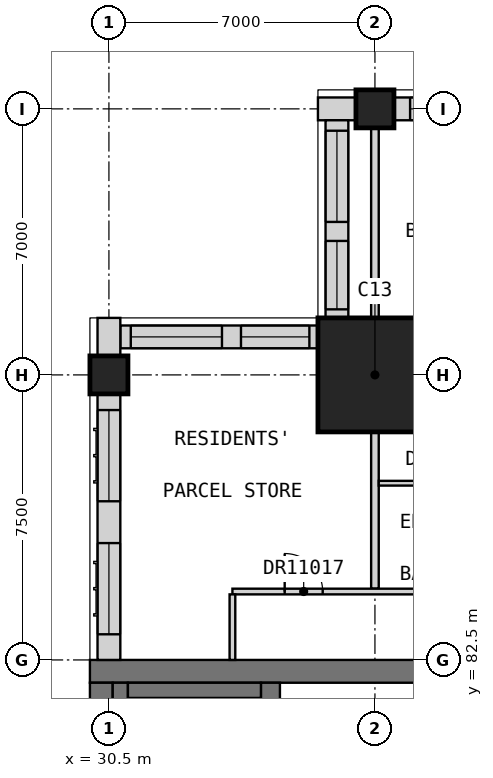
"""IFC4 building model, lengths in metres.
Left out: names, types, materials, properties, quantities, classifications, styles, units other than length and angle.
Written with IfcOpenShell. Run it as: python <this file> out.ifc"""

import sys

from ifc_helpers import new_model, si_unit, direction, frame, frame_2d, origin, origin_2d, place, context, subcontext, project, spatial, rectangle, extrude, element, fill, save


model = new_model("IFC4")
c1 = context("Model", 3, precision=1e-05, world=origin(), true_north=direction((0.0, 1.0)))
c2 = subcontext(c1, "Body", "Model", "MODEL_VIEW")
j1 = project(units=[si_unit("LENGTHUNIT", "METRE"), si_unit("PLANEANGLEUNIT", "RADIAN")], contexts=[c1])
p1 = place(None, origin())
s1 = spatial("IfcSite", under=j1, at=p1, CompositionType="ELEMENT")
p2 = place(p1, origin())
s2 = spatial("IfcBuilding", under=s1, at=p2, CompositionType="ELEMENT")
p3 = place(p2, frame((0.0, 0.0, 276.7)))
s3 = spatial("IfcBuildingStorey", under=s2, at=p3, CompositionType="ELEMENT", Elevation=276.7)
for number, where, z_axis, x_axis in (
    (1, (30.5, 90.0, 0.0), (0.0, 0.0, 1.0), (1.0, 0.0, 0.0)),
    (2, (37.5, 97.0, 0.0), (0.0, 0.0, 1.0), (1.0, 0.0, 0.0)),
):
    element("IfcColumn", number, at=place(p3, frame(where, z_axis=z_axis, x_axis=x_axis)), inside=s3, PredefinedType="COLUMN", context=c2, shape_type="SweptSolid", body=[
        extrude(rectangle(XDim=1.0, YDim=1.0, at=origin_2d()), origin(), (0.0, 0.0, 1.0), 3.5),
    ])
p4 = place(p3, frame((37.5, 90.0, 0.0), z_axis=(0.0, 0.0, 1.0), x_axis=(1.0, 0.0, 0.0)))
e3 = element("IfcColumn", 3, at=p4, inside=s3, PredefinedType="COLUMN", context=c2, shape_type="SweptSolid", body=[
    extrude(rectangle(XDim=3.0, YDim=3.0, at=origin_2d()), origin(), (0.0, 0.0, 1.0), 3.5),
])
p5 = place(p3, frame((30.0, 82.2, 0.0), z_axis=(0.0, 0.0, 1.0), x_axis=(1.0, 0.0, 0.0)))
e4 = element("IfcWall", 4, at=p5, inside=s3, PredefinedType="SHEAR", context=c2, shape_type="SweptSolid", body=[
    extrude(rectangle(XDim=30.0, YDim=0.6, at=frame_2d((15.0, 0.0))), origin(), (0.0, 0.0, 1.0), 3.5),
])
p6 = place(p3, frame((30.3, 60.6, 0.0), z_axis=(0.0, 0.0, 1.0), x_axis=(0.0, 1.0, 0.0)))
e5 = element("IfcWall", 5, at=p6, inside=s3, PredefinedType="SHEAR", context=c2, shape_type="SweptSolid", body=[
    extrude(rectangle(XDim=21.3, YDim=0.6, at=frame_2d((10.65, 0.0))), origin(), (0.0, 0.0, 1.0), 3.5),
])
p7 = place(p3, frame((34.75, 78.3, 0.0), z_axis=(0.0, 0.0, 1.0), x_axis=(0.0, 1.0, 0.0)))
e6 = element("IfcWall", 6, at=p7, inside=s3, PredefinedType="SHEAR", context=c2, shape_type="SweptSolid", body=[
    extrude(rectangle(XDim=3.6, YDim=0.5, at=frame_2d((1.8, 0.0))), origin(), (0.0, 0.0, 1.0), 3.5),
])
p8 = place(p3, frame((44.5, 97.0, 0.0), z_axis=(0.0, 0.0, 1.0), x_axis=(-1.0, 0.0, 0.0)))
e7 = element("IfcWall", 7, at=p8, inside=s3, PredefinedType="SOLIDWALL", context=c2, shape_type="SweptSolid", body=[
    extrude(rectangle(XDim=6.5, YDim=0.6, at=frame_2d((3.25, 0.0))), origin(), (0.0, 0.0, 1.0), 2.75),
])
p9 = place(p8, frame((3.675, 0.0, 0.8)))
e8 = element("IfcOpeningElement", 8, at=p9, cuts=e7, PredefinedType="OPENING", context=c2, shape_type="SweptSolid", body=[
    extrude(rectangle(XDim=2.4, YDim=1.8, at=frame_2d((1.2, 0.9))), frame((0.0, 0.31, 0.0), z_axis=(0.0, -1.0, 0.0), x_axis=(1.0, 0.0, 0.0)), (0.0, 0.0, 1.0), 0.62),
])
p10 = place(p8, frame((0.425, 0.0, 0.8)))
e9 = element("IfcOpeningElement", 9, at=p10, cuts=e7, PredefinedType="OPENING", context=c2, shape_type="SweptSolid", body=[
    extrude(rectangle(XDim=2.4, YDim=1.8, at=frame_2d((1.2, 0.9))), frame((0.0, 0.31, 0.0), z_axis=(0.0, -1.0, 0.0), x_axis=(1.0, 0.0, 0.0)), (0.0, 0.0, 1.0), 0.62),
])
p11 = place(p3, frame((37.0, 97.0, 0.0), z_axis=(0.0, 0.0, 1.0), x_axis=(-1.0, 0.0, 0.0)))
e10 = element("IfcWall", 10, at=p11, inside=s3, PredefinedType="SOLIDWALL", context=c2, shape_type="SweptSolid", body=[
    extrude(rectangle(XDim=1.0, YDim=0.6, at=frame_2d((0.5, 0.0))), origin(), (0.0, 0.0, 1.0), 3.25),
])
p12 = place(p3, frame((36.5, 96.7, 0.0), z_axis=(0.0, 0.0, 1.0), x_axis=(0.0, -1.0, 0.0)))
e11 = element("IfcWall", 11, at=p12, inside=s3, PredefinedType="SOLIDWALL", context=c2, shape_type="SweptSolid", body=[
    extrude(rectangle(XDim=5.2, YDim=0.6, at=frame_2d((2.6, 0.0))), origin(), (0.0, 0.0, 1.0), 3.25),
])
p13 = place(p12, frame((3.175, 0.0, 0.8)))
e12 = element("IfcOpeningElement", 12, at=p13, cuts=e11, PredefinedType="OPENING", context=c2, shape_type="SweptSolid", body=[
    extrude(rectangle(XDim=1.8, YDim=1.8, at=frame_2d((0.9, 0.9))), frame((0.0, 0.31, 0.0), z_axis=(0.0, -1.0, 0.0), x_axis=(1.0, 0.0, 0.0)), (0.0, 0.0, 1.0), 0.62),
])
p14 = place(p12, frame((0.275, 0.0, 0.8)))
e13 = element("IfcOpeningElement", 13, at=p14, cuts=e11, PredefinedType="OPENING", context=c2, shape_type="SweptSolid", body=[
    extrude(rectangle(XDim=2.4, YDim=1.8, at=frame_2d((1.2, 0.9))), frame((0.0, 0.31, 0.0), z_axis=(0.0, -1.0, 0.0), x_axis=(1.0, 0.0, 0.0)), (0.0, 0.0, 1.0), 0.62),
])
p15 = place(p3, frame((36.0, 91.0, 0.0), z_axis=(0.0, 0.0, 1.0), x_axis=(-1.0, 0.0, 0.0)))
e14 = element("IfcWall", 14, at=p15, inside=s3, PredefinedType="SOLIDWALL", context=c2, shape_type="SweptSolid", body=[
    extrude(rectangle(XDim=5.2, YDim=0.6, at=frame_2d((2.6, 0.0))), origin(), (0.0, 0.0, 1.0), 3.25),
])
p16 = place(p15, frame((2.525, 0.0, 0.8)))
e15 = element("IfcOpeningElement", 15, at=p16, cuts=e14, PredefinedType="OPENING", context=c2, shape_type="SweptSolid", body=[
    extrude(rectangle(XDim=2.4, YDim=1.8, at=frame_2d((1.2, 0.9))), frame((0.0, 0.31, 0.0), z_axis=(0.0, -1.0, 0.0), x_axis=(1.0, 0.0, 0.0)), (0.0, 0.0, 1.0), 0.62),
])
p17 = place(p15, frame((0.225, 0.0, 0.8)))
e16 = element("IfcOpeningElement", 16, at=p17, cuts=e14, PredefinedType="OPENING", context=c2, shape_type="SweptSolid", body=[
    extrude(rectangle(XDim=1.8, YDim=1.8, at=frame_2d((0.9, 0.9))), frame((0.0, 0.31, 0.0), z_axis=(0.0, -1.0, 0.0), x_axis=(1.0, 0.0, 0.0)), (0.0, 0.0, 1.0), 0.62),
])
p18 = place(p3, frame((30.5, 91.5, 0.0), z_axis=(0.0, 0.0, 1.0), x_axis=(0.0, -1.0, 0.0)))
e17 = element("IfcWall", 17, at=p18, inside=s3, PredefinedType="SOLIDWALL", context=c2, shape_type="SweptSolid", body=[
    extrude(rectangle(XDim=1.0, YDim=0.6, at=frame_2d((0.5, 0.0))), origin(), (0.0, 0.0, 1.0), 3.25),
])
p19 = place(p3, frame((30.5, 89.5, 0.0), z_axis=(0.0, 0.0, 1.0), x_axis=(0.0, -1.0, 0.0)))
e18 = element("IfcWall", 18, at=p19, inside=s3, PredefinedType="SOLIDWALL", context=c2, shape_type="SweptSolid", body=[
    extrude(rectangle(XDim=7.0, YDim=0.6, at=frame_2d((3.5, 0.0))), origin(), (0.0, 0.0, 1.0), 3.25),
])
p20 = place(p19, frame((3.925, 0.0, 0.8)))
e19 = element("IfcOpeningElement", 19, at=p20, cuts=e18, PredefinedType="OPENING", context=c2, shape_type="SweptSolid", body=[
    extrude(rectangle(XDim=2.4, YDim=1.8, at=frame_2d((1.2, 0.9))), frame((0.0, 0.31, 0.0), z_axis=(0.0, -1.0, 0.0), x_axis=(1.0, 0.0, 0.0)), (0.0, 0.0, 1.0), 0.62),
])
p21 = place(p19, frame((0.425, 0.0, 0.8)))
e20 = element("IfcOpeningElement", 20, at=p21, cuts=e18, PredefinedType="OPENING", context=c2, shape_type="SweptSolid", body=[
    extrude(rectangle(XDim=2.4, YDim=1.8, at=frame_2d((1.2, 0.9))), frame((0.0, 0.31, 0.0), z_axis=(0.0, -1.0, 0.0), x_axis=(1.0, 0.0, 0.0)), (0.0, 0.0, 1.0), 0.62),
])
p22 = place(p3, frame((30.8, 60.6, 0.0), z_axis=(0.0, 0.0, 1.0), x_axis=(0.0, 1.0, 0.0)))
e21 = element("IfcWall", 21, at=p22, inside=s3, PredefinedType="SOLIDWALL", context=c2, shape_type="SweptSolid", body=[
    extrude(rectangle(XDim=21.3, YDim=0.4, at=frame_2d((10.65, 0.0))), origin(), (0.0, 0.0, 1.0), 3.25),
])
p23 = place(p3, frame((31.0, 81.7, 0.0), z_axis=(0.0, 0.0, 1.0), x_axis=(1.0, 0.0, 0.0)))
e22 = element("IfcWall", 22, at=p23, inside=s3, PredefinedType="SOLIDWALL", context=c2, shape_type="SweptSolid", body=[
    extrude(rectangle(XDim=3.5, YDim=0.4, at=frame_2d((1.75, 0.0))), origin(), (0.0, 0.0, 1.0), 3.25),
])
p24 = place(p3, frame((37.5, 84.375, 0.0), z_axis=(0.0, 0.0, 1.0), x_axis=(0.0, 1.0, 0.0)))
e23 = element("IfcWall", 23, at=p24, inside=s3, PredefinedType="PARTITIONING", context=c2, shape_type="SweptSolid", body=[
    extrude(rectangle(XDim=13.125, YDim=0.2, at=frame_2d((6.562, 0.0))), origin(), (0.0, 0.0, 1.0), 2.75),
])
p25 = place(p3, frame((33.75, 84.3, 0.0), z_axis=(0.0, 0.0, 1.0), x_axis=(1.0, 0.0, 0.0)))
e24 = element("IfcWall", 24, at=p25, inside=s3, PredefinedType="PARTITIONING", context=c2, shape_type="SweptSolid", body=[
    extrude(rectangle(XDim=28.05, YDim=0.15, at=frame_2d((14.025, 0.0))), origin(), (0.0, 0.0, 1.0), 3.25),
])
p26 = place(p25, frame((1.375, 0.0, 0.0)))
e25 = element("IfcOpeningElement", 25, at=p26, cuts=e24, PredefinedType="OPENING", context=c2, shape_type="SweptSolid", body=[
    extrude(rectangle(XDim=1.0, YDim=2.1, at=frame_2d((0.5, 1.05))), frame((0.0, 0.085, 0.0), z_axis=(0.0, -1.0, 0.0), x_axis=(1.0, 0.0, 0.0)), (0.0, 0.0, 1.0), 0.17),
])
p27 = place(p25, frame((8.925, 0.0, 0.0)))
e26 = element("IfcOpeningElement", 26, at=p27, cuts=e24, PredefinedType="OPENING", context=c2, shape_type="SweptSolid", body=[
    extrude(rectangle(XDim=0.9, YDim=2.1, at=frame_2d((0.45, 1.05))), frame((0.0, 0.085, 0.0), z_axis=(0.0, -1.0, 0.0), x_axis=(1.0, 0.0, 0.0)), (0.0, 0.0, 1.0), 0.17),
])
p28 = place(p25, frame((20.175, 0.0, 0.0)))
e27 = element("IfcOpeningElement", 27, at=p28, cuts=e24, PredefinedType="OPENING", context=c2, shape_type="SweptSolid", body=[
    extrude(rectangle(XDim=0.9, YDim=2.1, at=frame_2d((0.45, 1.05))), frame((0.0, 0.085, 0.0), z_axis=(0.0, -1.0, 0.0), x_axis=(1.0, 0.0, 0.0)), (0.0, 0.0, 1.0), 0.17),
])
p29 = place(p25, frame((26.65, 0.0, 0.0)))
e28 = element("IfcOpeningElement", 28, at=p29, cuts=e24, PredefinedType="OPENING", context=c2, shape_type="SweptSolid", body=[
    extrude(rectangle(XDim=1.0, YDim=2.1, at=frame_2d((0.5, 1.05))), frame((0.0, 0.085, 0.0), z_axis=(0.0, -1.0, 0.0), x_axis=(1.0, 0.0, 0.0)), (0.0, 0.0, 1.0), 0.17),
])
p30 = place(p3, frame((33.75, 82.5, 0.0), z_axis=(0.0, 0.0, 1.0), x_axis=(0.0, 1.0, 0.0)))
e29 = element("IfcWall", 29, at=p30, inside=s3, PredefinedType="PARTITIONING", context=c2, shape_type="SweptSolid", body=[
    extrude(rectangle(XDim=1.725, YDim=0.15, at=frame_2d((0.863, 0.0))), origin(), (0.0, 0.0, 1.0), 3.25),
])
p31 = place(p3, frame((37.6, 90.0, 0.0), z_axis=(0.0, 0.0, 1.0), x_axis=(1.0, 0.0, 0.0)))
e30 = element("IfcWall", 30, at=p31, inside=s3, PredefinedType="PARTITIONING", context=c2, shape_type="SweptSolid", body=[
    extrude(rectangle(XDim=22.3, YDim=0.1, at=frame_2d((11.15, 0.0))), origin(), (0.0, 0.0, 1.0), 3.25),
])
p32 = place(p31, frame((1.475, 0.0, 0.0)))
e31 = element("IfcOpeningElement", 31, at=p32, cuts=e30, PredefinedType="OPENING", context=c2, shape_type="SweptSolid", body=[
    extrude(rectangle(XDim=0.9, YDim=2.1, at=frame_2d((0.45, 1.05))), frame((0.0, 0.06, 0.0), z_axis=(0.0, -1.0, 0.0), x_axis=(1.0, 0.0, 0.0)), (0.0, 0.0, 1.0), 0.12),
])
p33 = place(p31, frame((5.075, 0.0, 0.0)))
e32 = element("IfcOpeningElement", 32, at=p33, cuts=e30, PredefinedType="OPENING", context=c2, shape_type="SweptSolid", body=[
    extrude(rectangle(XDim=0.9, YDim=2.1, at=frame_2d((0.45, 1.05))), frame((0.0, 0.06, 0.0), z_axis=(0.0, -1.0, 0.0), x_axis=(1.0, 0.0, 0.0)), (0.0, 0.0, 1.0), 0.12),
])
p34 = place(p31, frame((12.575, 0.0, 0.0)))
e33 = element("IfcOpeningElement", 33, at=p34, cuts=e30, PredefinedType="OPENING", context=c2, shape_type="SweptSolid", body=[
    extrude(rectangle(XDim=0.9, YDim=2.1, at=frame_2d((0.45, 1.05))), frame((0.0, 0.06, 0.0), z_axis=(0.0, -1.0, 0.0), x_axis=(1.0, 0.0, 0.0)), (0.0, 0.0, 1.0), 0.12),
])
p35 = place(p31, frame((16.325, 0.0, 0.0)))
e34 = element("IfcOpeningElement", 34, at=p35, cuts=e30, PredefinedType="OPENING", context=c2, shape_type="SweptSolid", body=[
    extrude(rectangle(XDim=0.9, YDim=2.1, at=frame_2d((0.45, 1.05))), frame((0.0, 0.06, 0.0), z_axis=(0.0, -1.0, 0.0), x_axis=(1.0, 0.0, 0.0)), (0.0, 0.0, 1.0), 0.12),
])
p36 = place(p3, frame((37.6, 87.15, 0.0), z_axis=(0.0, 0.0, 1.0), x_axis=(1.0, 0.0, 0.0)))
e35 = element("IfcWall", 35, at=p36, inside=s3, PredefinedType="PARTITIONING", context=c2, shape_type="SweptSolid", body=[
    extrude(rectangle(XDim=3.65, YDim=0.125, at=frame_2d((1.825, 0.0))), origin(), (0.0, 0.0, 1.0), 3.25),
])
p37 = place(p36, frame((1.325, 0.0, 0.0)))
e36 = element("IfcOpeningElement", 36, at=p37, cuts=e35, PredefinedType="OPENING", context=c2, shape_type="SweptSolid", body=[
    extrude(rectangle(XDim=0.9, YDim=2.1, at=frame_2d((0.45, 1.05))), frame((0.0, 0.073, 0.0), z_axis=(0.0, -1.0, 0.0), x_axis=(1.0, 0.0, 0.0)), (0.0, 0.0, 1.0), 0.145),
])
p38 = place(p9, origin())
e37 = element("IfcWindow", 37, at=p38, inside=s3, PartitioningType="SINGLE_PANEL", PredefinedType="WINDOW", context=c2, shape_type="SweptSolid", body=[
    extrude(rectangle(XDim=2.4, YDim=1.8, at=frame_2d((1.2, 0.9))), frame((0.0, -0.07, 0.0), z_axis=(0.0, -1.0, 0.0), x_axis=(1.0, 0.0, 0.0)), (0.0, 0.0, 1.0), 0.06),
])
fill(e8, e37)
p39 = place(p13, origin())
e38 = element("IfcWindow", 38, at=p39, inside=s3, PartitioningType="SINGLE_PANEL", PredefinedType="WINDOW", context=c2, shape_type="SweptSolid", body=[
    extrude(rectangle(XDim=1.8, YDim=1.8, at=frame_2d((0.9, 0.9))), frame((0.0, -0.07, 0.0), z_axis=(0.0, -1.0, 0.0), x_axis=(1.0, 0.0, 0.0)), (0.0, 0.0, 1.0), 0.06),
])
fill(e12, e38)
p40 = place(p14, origin())
e39 = element("IfcWindow", 39, at=p40, inside=s3, PartitioningType="SINGLE_PANEL", PredefinedType="WINDOW", context=c2, shape_type="SweptSolid", body=[
    extrude(rectangle(XDim=2.4, YDim=1.8, at=frame_2d((1.2, 0.9))), frame((0.0, -0.07, 0.0), z_axis=(0.0, -1.0, 0.0), x_axis=(1.0, 0.0, 0.0)), (0.0, 0.0, 1.0), 0.06),
])
fill(e13, e39)
p41 = place(p16, origin())
e40 = element("IfcWindow", 40, at=p41, inside=s3, PartitioningType="SINGLE_PANEL", PredefinedType="WINDOW", context=c2, shape_type="SweptSolid", body=[
    extrude(rectangle(XDim=2.4, YDim=1.8, at=frame_2d((1.2, 0.9))), frame((0.0, -0.07, 0.0), z_axis=(0.0, -1.0, 0.0), x_axis=(1.0, 0.0, 0.0)), (0.0, 0.0, 1.0), 0.06),
])
fill(e15, e40)
p42 = place(p17, origin())
e41 = element("IfcWindow", 41, at=p42, inside=s3, PartitioningType="SINGLE_PANEL", PredefinedType="WINDOW", context=c2, shape_type="SweptSolid", body=[
    extrude(rectangle(XDim=1.8, YDim=1.8, at=frame_2d((0.9, 0.9))), frame((0.0, -0.07, 0.0), z_axis=(0.0, -1.0, 0.0), x_axis=(1.0, 0.0, 0.0)), (0.0, 0.0, 1.0), 0.06),
])
fill(e16, e41)
p43 = place(p20, origin())
e42 = element("IfcWindow", 42, at=p43, inside=s3, PartitioningType="SINGLE_PANEL", PredefinedType="WINDOW", context=c2, shape_type="SweptSolid", body=[
    extrude(rectangle(XDim=2.4, YDim=1.8, at=frame_2d((1.2, 0.9))), frame((0.0, -0.07, 0.0), z_axis=(0.0, -1.0, 0.0), x_axis=(1.0, 0.0, 0.0)), (0.0, 0.0, 1.0), 0.06),
])
fill(e19, e42)
p44 = place(p21, origin())
e43 = element("IfcWindow", 43, at=p44, inside=s3, PartitioningType="SINGLE_PANEL", PredefinedType="WINDOW", context=c2, shape_type="SweptSolid", body=[
    extrude(rectangle(XDim=2.4, YDim=1.8, at=frame_2d((1.2, 0.9))), frame((0.0, -0.07, 0.0), z_axis=(0.0, -1.0, 0.0), x_axis=(1.0, 0.0, 0.0)), (0.0, 0.0, 1.0), 0.06),
])
fill(e20, e43)
p45 = place(p26, origin())
e44 = element("IfcDoor", 44, at=p45, inside=s3, OperationType="SINGLE_SWING_LEFT", PredefinedType="DOOR", context=c2, shape_type="SweptSolid", body=[
    extrude(rectangle(XDim=1.0, YDim=2.1, at=frame_2d((0.5, 1.05))), frame((0.0, 0.025, 0.0), z_axis=(0.0, -1.0, 0.0), x_axis=(1.0, 0.0, 0.0)), (0.0, 0.0, 1.0), 0.05),
])
fill(e25, e44)
save(model, sys.argv[1])
